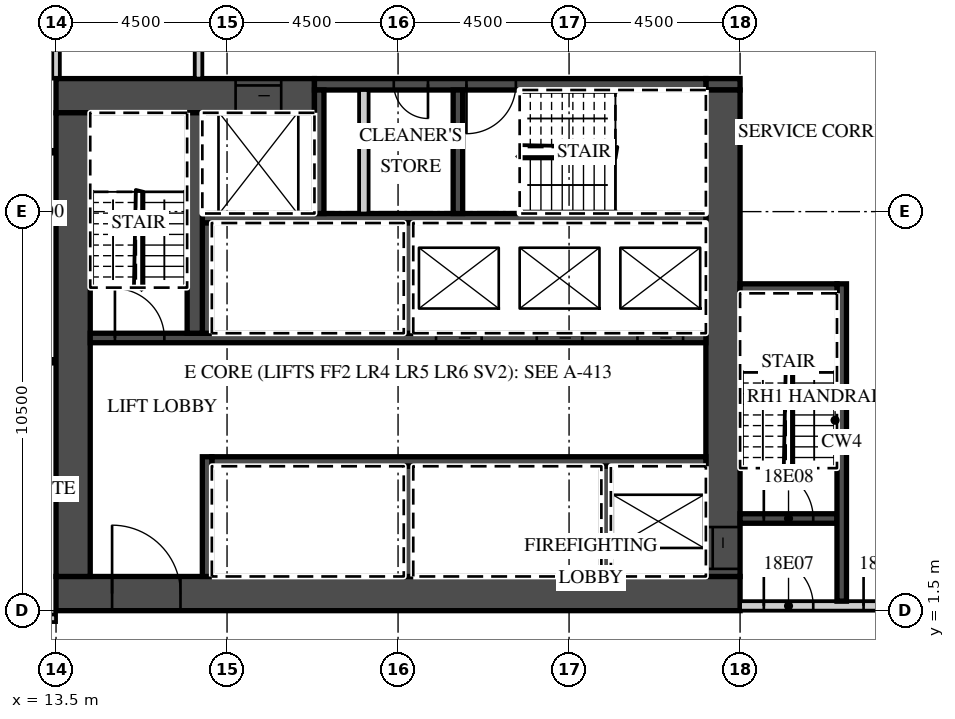
"""IFC4 building model, lengths in metres.
Left out: names, types, materials, properties, quantities, classifications, styles, units other than length and angle.
Written with IfcOpenShell. Run it as: python <this file> out.ifc"""

import sys

from ifc_helpers import new_model, si_unit, direction, frame, frame_2d, origin, place, context, subcontext, project, spatial, rectangle, extrude, element, fill, save


model = new_model("IFC4")
c1 = context("Model", 3, precision=1e-05, world=origin(), true_north=direction((0.0, 1.0)))
c2 = subcontext(c1, "Body", "Model", "MODEL_VIEW")
j1 = project(units=[si_unit("LENGTHUNIT", "METRE"), si_unit("PLANEANGLEUNIT", "RADIAN")], contexts=[c1])
p1 = place(None, origin())
s1 = spatial("IfcSite", under=j1, at=p1, CompositionType="ELEMENT")
p2 = place(p1, origin())
s2 = spatial("IfcBuilding", under=s1, at=p2, CompositionType="ELEMENT")
p3 = place(p2, frame((0.0, 0.0, 89.7)))
s3 = spatial("IfcBuildingStorey", under=s2, at=p3, CompositionType="ELEMENT", Elevation=89.7)
p4 = place(p3, frame((13.5, 15.5, 0.0), z_axis=(0.0, 0.0, 1.0), x_axis=(0.0, 1.0, 0.0)))
e1 = element("IfcWall", 1, at=p4, inside=s3, PredefinedType="PARTITIONING", context=c2, shape_type="SweptSolid", body=[
    extrude(rectangle(XDim=6.05, YDim=0.2, at=frame_2d((3.025, 0.0))), origin(), (0.0, 0.0, 1.0), 3.02),
])
p5 = place(p3, frame((-44.55, 1.3, 0.0), z_axis=(0.0, 0.0, 1.0), x_axis=(1.0, 0.0, 0.0)))
e2 = element("IfcWall", 2, at=p5, inside=s3, PredefinedType="PARTITIONING", context=c2, shape_type="SweptSolid", body=[
    extrude(rectangle(XDim=58.05, YDim=0.2, at=frame_2d((29.025, 0.0))), origin(), (0.0, 0.0, 1.0), 3.02),
])
p6 = place(p5, frame((0.525, 0.0, 0.0)))
e3 = element("IfcOpeningElement", 3, at=p6, cuts=e2, PredefinedType="OPENING", context=c2, shape_type="SweptSolid", body=[
    extrude(rectangle(XDim=1.0, YDim=2.1, at=frame_2d((0.5, 1.05))), frame((0.0, 0.11, 0.0), z_axis=(0.0, -1.0, 0.0), x_axis=(1.0, 0.0, 0.0)), (0.0, 0.0, 1.0), 0.22),
])
p7 = place(p5, frame((6.975, 0.0, 0.0)))
e4 = element("IfcOpeningElement", 4, at=p7, cuts=e2, PredefinedType="OPENING", context=c2, shape_type="SweptSolid", body=[
    extrude(rectangle(XDim=1.0, YDim=2.1, at=frame_2d((0.5, 1.05))), frame((0.0, 0.11, 0.0), z_axis=(0.0, -1.0, 0.0), x_axis=(1.0, 0.0, 0.0)), (0.0, 0.0, 1.0), 0.22),
])
p8 = place(p5, frame((11.5, 0.0, 0.0)))
e5 = element("IfcOpeningElement", 5, at=p8, cuts=e2, PredefinedType="OPENING", context=c2, shape_type="SweptSolid", body=[
    extrude(rectangle(XDim=1.0, YDim=2.1, at=frame_2d((0.5, 1.05))), frame((0.0, 0.11, 0.0), z_axis=(0.0, -1.0, 0.0), x_axis=(1.0, 0.0, 0.0)), (0.0, 0.0, 1.0), 0.22),
])
p9 = place(p5, frame((13.6, 0.0, 0.0)))
e6 = element("IfcOpeningElement", 6, at=p9, cuts=e2, PredefinedType="OPENING", context=c2, shape_type="SweptSolid", body=[
    extrude(rectangle(XDim=1.0, YDim=2.1, at=frame_2d((0.5, 1.05))), frame((0.0, 0.11, 0.0), z_axis=(0.0, -1.0, 0.0), x_axis=(1.0, 0.0, 0.0)), (0.0, 0.0, 1.0), 0.22),
])
p10 = place(p5, frame((22.912, 0.0, 0.0)))
e7 = element("IfcOpeningElement", 7, at=p10, cuts=e2, PredefinedType="OPENING", context=c2, shape_type="SweptSolid", body=[
    extrude(rectangle(XDim=1.2, YDim=2.1, at=frame_2d((0.6, 1.05))), frame((0.0, 0.11, 0.0), z_axis=(0.0, -1.0, 0.0), x_axis=(1.0, 0.0, 0.0)), (0.0, 0.0, 1.0), 0.22),
])
p11 = place(p5, frame((31.912, 0.0, 0.0)))
e8 = element("IfcOpeningElement", 8, at=p11, cuts=e2, PredefinedType="OPENING", context=c2, shape_type="SweptSolid", body=[
    extrude(rectangle(XDim=1.2, YDim=2.1, at=frame_2d((0.6, 1.05))), frame((0.0, 0.11, 0.0), z_axis=(0.0, -1.0, 0.0), x_axis=(1.0, 0.0, 0.0)), (0.0, 0.0, 1.0), 0.22),
])
p12 = place(p5, frame((37.987, 0.0, 0.0)))
e9 = element("IfcOpeningElement", 9, at=p12, cuts=e2, PredefinedType="OPENING", context=c2, shape_type="SweptSolid", body=[
    extrude(rectangle(XDim=1.2, YDim=2.1, at=frame_2d((0.6, 1.05))), frame((0.0, 0.11, 0.0), z_axis=(0.0, -1.0, 0.0), x_axis=(1.0, 0.0, 0.0)), (0.0, 0.0, 1.0), 0.22),
])
p13 = place(p5, frame((46.987, 0.0, 0.0)))
e10 = element("IfcOpeningElement", 10, at=p13, cuts=e2, PredefinedType="OPENING", context=c2, shape_type="SweptSolid", body=[
    extrude(rectangle(XDim=1.2, YDim=2.1, at=frame_2d((0.6, 1.05))), frame((0.0, 0.11, 0.0), z_axis=(0.0, -1.0, 0.0), x_axis=(1.0, 0.0, 0.0)), (0.0, 0.0, 1.0), 0.22),
])
p14 = place(p5, frame((54.125, 0.0, 0.0)))
e11 = element("IfcOpeningElement", 11, at=p14, cuts=e2, PredefinedType="OPENING", context=c2, shape_type="SweptSolid", body=[
    extrude(rectangle(XDim=1.0, YDim=2.1, at=frame_2d((0.5, 1.05))), frame((0.0, 0.11, 0.0), z_axis=(0.0, -1.0, 0.0), x_axis=(1.0, 0.0, 0.0)), (0.0, 0.0, 1.0), 0.22),
])
p15 = place(p3, frame((13.5, 1.95, 0.0), z_axis=(0.0, 0.0, 1.0), x_axis=(1.0, 0.0, 0.0)))
e12 = element("IfcWall", 12, at=p15, inside=s3, PredefinedType="SHEAR", context=c2, shape_type="SweptSolid", body=[
    extrude(rectangle(XDim=18.0, YDim=0.9, at=frame_2d((9.0, 0.0))), origin(), (0.0, 0.0, 1.0), 3.02),
])
p16 = place(p15, frame((1.475, 0.0, 0.0)))
e13 = element("IfcOpeningElement", 13, at=p16, cuts=e12, PredefinedType="OPENING", context=c2, shape_type="SweptSolid", body=[
    extrude(rectangle(XDim=1.8, YDim=2.1, at=frame_2d((0.9, 1.05))), frame((0.0, 0.46, 0.0), z_axis=(0.0, -1.0, 0.0), x_axis=(1.0, 0.0, 0.0)), (0.0, 0.0, 1.0), 0.92),
])
p17 = place(p3, frame((13.5, 15.05, 0.0), z_axis=(0.0, 0.0, 1.0), x_axis=(1.0, 0.0, 0.0)))
e14 = element("IfcWall", 14, at=p17, inside=s3, PredefinedType="SHEAR", context=c2, shape_type="SweptSolid", body=[
    extrude(rectangle(XDim=6.8, YDim=0.9, at=frame_2d((3.4, 0.0))), origin(), (0.0, 0.0, 1.0), 3.02),
])
p18 = place(p17, frame((4.725, 0.0, 0.0)))
e15 = element("IfcOpeningElement", 15, at=p18, cuts=e14, PredefinedType="OPENING", context=c2, shape_type="SweptSolid", body=[
    extrude(rectangle(XDim=1.2, YDim=2.1, at=frame_2d((0.6, 1.05))), frame((0.0, 0.46, 0.0), z_axis=(0.0, -1.0, 0.0), x_axis=(1.0, 0.0, 0.0)), (0.0, 0.0, 1.0), 0.92),
])
p19 = place(p3, frame((30.6, 15.35, 0.0), z_axis=(0.0, 0.0, 1.0), x_axis=(1.0, 0.0, 0.0)))
e16 = element("IfcWall", 16, at=p19, inside=s3, PredefinedType="SHEAR", context=c2, shape_type="SweptSolid", body=[
    extrude(rectangle(XDim=0.9, YDim=0.3, at=frame_2d((0.45, 0.0))), origin(), (0.0, 0.0, 1.0), 3.02),
])
p20 = place(p3, frame((20.3, 15.35, 0.0), z_axis=(0.0, 0.0, 1.0), x_axis=(1.0, 0.0, 0.0)))
e17 = element("IfcWall", 17, at=p20, inside=s3, PredefinedType="SHEAR", context=c2, shape_type="SweptSolid", body=[
    extrude(rectangle(XDim=10.3, YDim=0.3, at=frame_2d((5.15, 0.0))), origin(), (0.0, 0.0, 1.0), 3.02),
])
p21 = place(p20, frame((4.0, 0.0, 0.0)))
e18 = element("IfcOpeningElement", 18, at=p21, cuts=e17, PredefinedType="OPENING", context=c2, shape_type="SweptSolid", body=[
    extrude(rectangle(XDim=1.3, YDim=2.1, at=frame_2d((0.65, 1.05))), frame((0.0, 0.16, 0.0), z_axis=(0.0, -1.0, 0.0), x_axis=(1.0, 0.0, 0.0)), (0.0, 0.0, 1.0), 0.32),
])
p22 = place(p20, frame((2.087, 0.0, 0.0)))
e19 = element("IfcOpeningElement", 19, at=p22, cuts=e17, PredefinedType="OPENING", context=c2, shape_type="SweptSolid", body=[
    extrude(rectangle(XDim=0.9, YDim=2.1, at=frame_2d((0.45, 1.05))), frame((0.0, 0.16, 0.0), z_axis=(0.0, -1.0, 0.0), x_axis=(1.0, 0.0, 0.0)), (0.0, 0.0, 1.0), 0.32),
])
p23 = place(p3, frame((31.05, 2.4, 0.0), z_axis=(0.0, 0.0, 1.0), x_axis=(0.0, 1.0, 0.0)))
e20 = element("IfcWall", 20, at=p23, inside=s3, PredefinedType="SHEAR", context=c2, shape_type="SweptSolid", body=[
    extrude(rectangle(XDim=12.8, YDim=0.9, at=frame_2d((6.4, 0.0))), origin(), (0.0, 0.0, 1.0), 3.02),
])
p24 = place(p23, frame((0.2, 0.0, 0.0)))
e21 = element("IfcOpeningElement", 21, at=p24, cuts=e20, PredefinedType="OPENING", context=c2, shape_type="SweptSolid", body=[
    extrude(rectangle(XDim=1.1, YDim=2.1, at=frame_2d((0.55, 1.05))), frame((0.0, 0.46, 0.0), z_axis=(0.0, -1.0, 0.0), x_axis=(1.0, 0.0, 0.0)), (0.0, 0.0, 1.0), 0.92),
])
p25 = place(p3, frame((13.95, 2.4, 0.0), z_axis=(0.0, 0.0, 1.0), x_axis=(0.0, 1.0, 0.0)))
e22 = element("IfcWall", 22, at=p25, inside=s3, PredefinedType="SHEAR", context=c2, shape_type="SweptSolid", body=[
    extrude(rectangle(XDim=12.2, YDim=0.9, at=frame_2d((6.1, 0.0))), origin(), (0.0, 0.0, 1.0), 3.02),
])
p26 = place(p3, frame((17.6, 5.425, 0.0), z_axis=(0.0, 0.0, 1.0), x_axis=(1.0, 0.0, 0.0)))
e23 = element("IfcWall", 23, at=p26, inside=s3, PredefinedType="SHEAR", context=c2, shape_type="SweptSolid", body=[
    extrude(rectangle(XDim=13.0, YDim=0.25, at=frame_2d((6.5, 0.0))), origin(), (0.0, 0.0, 1.0), 3.02),
])
p27 = place(p3, frame((17.475, 2.4, 0.0), z_axis=(0.0, 0.0, 1.0), x_axis=(0.0, 1.0, 0.0)))
e24 = element("IfcWall", 24, at=p27, inside=s3, PredefinedType="SHEAR", context=c2, shape_type="SweptSolid", body=[
    extrude(rectangle(XDim=3.15, YDim=0.25, at=frame_2d((1.575, 0.0))), origin(), (0.0, 0.0, 1.0), 3.02),
])
for number, where, z_axis, x_axis in (
    (25, (27.975, 2.4, 0.0), (0.0, 0.0, 1.0), (0.0, 1.0, 0.0)),
    (26, (22.775, 2.4, 0.0), (0.0, 0.0, 1.0), (0.0, 1.0, 0.0)),
):
    element("IfcWall", number, at=place(p3, frame(where, z_axis=z_axis, x_axis=x_axis)), inside=s3, PredefinedType="SHEAR", context=c2, shape_type="SweptSolid", body=[
        extrude(rectangle(XDim=2.9, YDim=0.25, at=frame_2d((1.45, 0.0))), origin(), (0.0, 0.0, 1.0), 3.02),
    ])
p28 = place(p3, frame((14.4, 8.675, 0.0), z_axis=(0.0, 0.0, 1.0), x_axis=(1.0, 0.0, 0.0)))
e27 = element("IfcWall", 27, at=p28, inside=s3, PredefinedType="SHEAR", context=c2, shape_type="SweptSolid", body=[
    extrude(rectangle(XDim=16.2, YDim=0.25, at=frame_2d((8.1, 0.0))), origin(), (0.0, 0.0, 1.0), 3.02),
])
p29 = place(p28, frame((14.4, 0.0, 0.0)))
e28 = element("IfcOpeningElement", 28, at=p29, cuts=e27, PredefinedType="OPENING", context=c2, shape_type="SweptSolid", body=[
    extrude(rectangle(XDim=1.2, YDim=2.1, at=frame_2d((0.6, 1.05))), frame((0.0, 0.135, 0.0), z_axis=(0.0, -1.0, 0.0), x_axis=(1.0, 0.0, 0.0)), (0.0, 0.0, 1.0), 0.27),
])
p30 = place(p28, frame((11.75, 0.0, 0.0)))
e29 = element("IfcOpeningElement", 29, at=p30, cuts=e27, PredefinedType="OPENING", context=c2, shape_type="SweptSolid", body=[
    extrude(rectangle(XDim=1.2, YDim=2.1, at=frame_2d((0.6, 1.05))), frame((0.0, 0.135, 0.0), z_axis=(0.0, -1.0, 0.0), x_axis=(1.0, 0.0, 0.0)), (0.0, 0.0, 1.0), 0.27),
])
p31 = place(p28, frame((9.1, 0.0, 0.0)))
e30 = element("IfcOpeningElement", 30, at=p31, cuts=e27, PredefinedType="OPENING", context=c2, shape_type="SweptSolid", body=[
    extrude(rectangle(XDim=1.2, YDim=2.1, at=frame_2d((0.6, 1.05))), frame((0.0, 0.135, 0.0), z_axis=(0.0, -1.0, 0.0), x_axis=(1.0, 0.0, 0.0)), (0.0, 0.0, 1.0), 0.27),
])
p32 = place(p28, frame((0.65, 0.0, 0.0)))
e31 = element("IfcOpeningElement", 31, at=p32, cuts=e27, PredefinedType="OPENING", context=c2, shape_type="SweptSolid", body=[
    extrude(rectangle(XDim=1.3, YDim=2.1, at=frame_2d((0.65, 1.05))), frame((0.0, 0.135, 0.0), z_axis=(0.0, -1.0, 0.0), x_axis=(1.0, 0.0, 0.0)), (0.0, 0.0, 1.0), 0.27),
])
p33 = place(p3, frame((17.35, 11.825, 0.0), z_axis=(0.0, 0.0, 1.0), x_axis=(1.0, 0.0, 0.0)))
e32 = element("IfcWall", 32, at=p33, inside=s3, PredefinedType="SHEAR", context=c2, shape_type="SweptSolid", body=[
    extrude(rectangle(XDim=13.25, YDim=0.25, at=frame_2d((6.625, 0.0))), origin(), (0.0, 0.0, 1.0), 3.02),
])
for number, where, z_axis, x_axis in (
    (33, (17.475, 8.8, 0.0), (0.0, 0.0, 1.0), (0.0, 1.0, 0.0)),
    (34, (22.775, 8.8, 0.0), (0.0, 0.0, 1.0), (0.0, 1.0, 0.0)),
):
    element("IfcWall", number, at=place(p3, frame(where, z_axis=z_axis, x_axis=x_axis)), inside=s3, PredefinedType="SHEAR", context=c2, shape_type="SweptSolid", body=[
        extrude(rectangle(XDim=2.9, YDim=0.25, at=frame_2d((1.45, 0.0))), origin(), (0.0, 0.0, 1.0), 3.02),
    ])
p34 = place(p3, frame((17.15, 8.8, 0.0), z_axis=(0.0, 0.0, 1.0), x_axis=(0.0, 1.0, 0.0)))
e35 = element("IfcWall", 35, at=p34, inside=s3, PredefinedType="SHEAR", context=c2, shape_type="SweptSolid", body=[
    extrude(rectangle(XDim=5.8, YDim=0.4, at=frame_2d((2.9, 0.0))), origin(), (0.0, 0.0, 1.0), 3.02),
])
for number, where, z_axis, x_axis in (
    (36, (20.425, 11.95, 0.0), (0.0, 0.0, 1.0), (0.0, 1.0, 0.0)),
    (37, (24.075, 11.95, 0.0), (0.0, 0.0, 1.0), (0.0, 1.0, 0.0)),
):
    element("IfcWall", number, at=place(p3, frame(where, z_axis=z_axis, x_axis=x_axis)), inside=s3, PredefinedType="SHEAR", context=c2, shape_type="SweptSolid", body=[
        extrude(rectangle(XDim=3.25, YDim=0.25, at=frame_2d((1.625, 0.0))), origin(), (0.0, 0.0, 1.0), 3.02),
    ])
p35 = place(p3, frame((21.6, 11.95, 0.0), z_axis=(0.0, 0.0, 1.0), x_axis=(0.0, 1.0, 0.0)))
e38 = element("IfcWall", 38, at=p35, inside=s3, PredefinedType="PARTITIONING", context=c2, shape_type="SweptSolid", body=[
    extrude(rectangle(XDim=3.25, YDim=0.25, at=frame_2d((1.625, 0.0))), origin(), (0.0, 0.0, 1.0), 3.02),
])
p36 = place(p3, frame((31.5, 1.625, 0.0), z_axis=(0.0, 0.0, 1.0), x_axis=(1.0, 0.0, 0.0)))
e39 = element("IfcWall", 39, at=p36, inside=s3, PredefinedType="PARTITIONING", context=c2, shape_type="SweptSolid", body=[
    extrude(rectangle(XDim=13.05, YDim=0.25, at=frame_2d((6.525, 0.0))), origin(), (0.0, 0.0, 1.0), 3.02),
])
p37 = place(p36, frame((0.625, 0.0, 0.0)))
e40 = element("IfcOpeningElement", 40, at=p37, cuts=e39, PredefinedType="OPENING", context=c2, shape_type="SweptSolid", body=[
    extrude(rectangle(XDim=1.3, YDim=2.1, at=frame_2d((0.65, 1.05))), frame((0.0, 0.135, 0.0), z_axis=(0.0, -1.0, 0.0), x_axis=(1.0, 0.0, 0.0)), (0.0, 0.0, 1.0), 0.27),
])
p38 = place(p36, frame((3.25, 0.0, 0.0)))
e41 = element("IfcOpeningElement", 41, at=p38, cuts=e39, PredefinedType="OPENING", context=c2, shape_type="SweptSolid", body=[
    extrude(rectangle(XDim=1.1, YDim=2.1, at=frame_2d((0.55, 1.05))), frame((0.0, 0.135, 0.0), z_axis=(0.0, -1.0, 0.0), x_axis=(1.0, 0.0, 0.0)), (0.0, 0.0, 1.0), 0.27),
])
p39 = place(p3, frame((31.5, 3.925, 0.0), z_axis=(0.0, 0.0, 1.0), x_axis=(1.0, 0.0, 0.0)))
e42 = element("IfcWall", 42, at=p39, inside=s3, PredefinedType="SHEAR", context=c2, shape_type="SweptSolid", body=[
    extrude(rectangle(XDim=2.55, YDim=0.25, at=frame_2d((1.275, 0.0))), origin(), (0.0, 0.0, 1.0), 3.02),
])
p40 = place(p39, frame((0.625, 0.0, 0.0)))
e43 = element("IfcOpeningElement", 43, at=p40, cuts=e42, PredefinedType="OPENING", context=c2, shape_type="SweptSolid", body=[
    extrude(rectangle(XDim=1.3, YDim=2.1, at=frame_2d((0.65, 1.05))), frame((0.0, 0.135, 0.0), z_axis=(0.0, -1.0, 0.0), x_axis=(1.0, 0.0, 0.0)), (0.0, 0.0, 1.0), 0.27),
])
p41 = place(p3, frame((34.175, 1.75, 0.0), z_axis=(0.0, 0.0, 1.0), x_axis=(0.0, 1.0, 0.0)))
e44 = element("IfcWall", 44, at=p41, inside=s3, PredefinedType="SHEAR", context=c2, shape_type="SweptSolid", body=[
    extrude(rectangle(XDim=8.35, YDim=0.25, at=frame_2d((4.175, 0.0))), origin(), (0.0, 0.0, 1.0), 3.02),
])
p42 = place(p3, frame((31.5, 9.975, 0.0), z_axis=(0.0, 0.0, 1.0), x_axis=(1.0, 0.0, 0.0)))
e45 = element("IfcWall", 45, at=p42, inside=s3, PredefinedType="SHEAR", context=c2, shape_type="SweptSolid", body=[
    extrude(rectangle(XDim=2.55, YDim=0.25, at=frame_2d((1.275, 0.0))), origin(), (0.0, 0.0, 1.0), 3.02),
])
p43 = place(p3, frame((17.25, 15.5, 0.0), z_axis=(0.0, 0.0, 1.0), x_axis=(0.0, 1.0, 0.0)))
e46 = element("IfcWall", 46, at=p43, inside=s3, PredefinedType="PARTITIONING", context=c2, shape_type="SweptSolid", body=[
    extrude(rectangle(XDim=2.2, YDim=0.2, at=frame_2d((1.1, 0.0))), origin(), (0.0, 0.0, 1.0), 3.02),
])
p44 = place(p29, origin())
e47 = element("IfcDoor", 47, at=p44, inside=s3, OperationType="SLIDING_TO_LEFT", PredefinedType="DOOR", context=c2, shape_type="SweptSolid", body=[
    extrude(rectangle(XDim=1.2, YDim=2.1, at=frame_2d((0.6, 1.05))), frame((0.0, 0.025, 0.0), z_axis=(0.0, -1.0, 0.0), x_axis=(1.0, 0.0, 0.0)), (0.0, 0.0, 1.0), 0.05),
])
fill(e28, e47)
p45 = place(p30, origin())
e48 = element("IfcDoor", 48, at=p45, inside=s3, OperationType="SLIDING_TO_RIGHT", PredefinedType="DOOR", context=c2, shape_type="SweptSolid", body=[
    extrude(rectangle(XDim=1.2, YDim=2.1, at=frame_2d((0.6, 1.05))), frame((0.0, 0.025, 0.0), z_axis=(0.0, -1.0, 0.0), x_axis=(1.0, 0.0, 0.0)), (0.0, 0.0, 1.0), 0.05),
])
fill(e29, e48)
p46 = place(p31, origin())
e49 = element("IfcDoor", 49, at=p46, inside=s3, OperationType="SLIDING_TO_RIGHT", PredefinedType="DOOR", context=c2, shape_type="SweptSolid", body=[
    extrude(rectangle(XDim=1.2, YDim=2.1, at=frame_2d((0.6, 1.05))), frame((0.0, 0.025, 0.0), z_axis=(0.0, -1.0, 0.0), x_axis=(1.0, 0.0, 0.0)), (0.0, 0.0, 1.0), 0.05),
])
fill(e30, e49)
p47 = place(p18, origin())
e50 = element("IfcDoor", 50, at=p47, inside=s3, OperationType="SLIDING_TO_LEFT", PredefinedType="DOOR", context=c2, shape_type="SweptSolid", body=[
    extrude(rectangle(XDim=1.2, YDim=2.1, at=frame_2d((0.6, 1.05))), frame((0.0, 0.025, 0.0), z_axis=(0.0, -1.0, 0.0), x_axis=(1.0, 0.0, 0.0)), (0.0, 0.0, 1.0), 0.05),
])
fill(e15, e50)
p48 = place(p24, origin())
e51 = element("IfcDoor", 51, at=p48, inside=s3, OperationType="SLIDING_TO_LEFT", PredefinedType="DOOR", context=c2, shape_type="SweptSolid", body=[
    extrude(rectangle(XDim=1.1, YDim=2.1, at=frame_2d((0.55, 1.05))), frame((0.0, 0.025, 0.0), z_axis=(0.0, -1.0, 0.0), x_axis=(1.0, 0.0, 0.0)), (0.0, 0.0, 1.0), 0.05),
])
fill(e21, e51)
p49 = place(p16, origin())
e52 = element("IfcDoor", 52, at=p49, inside=s3, OperationType="DOUBLE_DOOR_DOUBLE_SWING", PredefinedType="DOOR", context=c2, shape_type="SweptSolid", body=[
    extrude(rectangle(XDim=1.8, YDim=2.1, at=frame_2d((0.9, 1.05))), frame((0.0, 0.025, 0.0), z_axis=(0.0, -1.0, 0.0), x_axis=(1.0, 0.0, 0.0)), (0.0, 0.0, 1.0), 0.05),
])
fill(e13, e52)
p50 = place(p37, origin())
e53 = element("IfcDoor", 53, at=p50, inside=s3, OperationType="SINGLE_SWING_LEFT", PredefinedType="DOOR", context=c2, shape_type="SweptSolid", body=[
    extrude(rectangle(XDim=1.3, YDim=2.1, at=frame_2d((0.65, 1.05))), frame((0.0, 0.025, 0.0), z_axis=(0.0, -1.0, 0.0), x_axis=(1.0, 0.0, 0.0)), (0.0, 0.0, 1.0), 0.05),
])
fill(e40, e53)
p51 = place(p40, origin())
e54 = element("IfcDoor", 54, at=p51, inside=s3, OperationType="SINGLE_SWING_LEFT", PredefinedType="DOOR", context=c2, shape_type="SweptSolid", body=[
    extrude(rectangle(XDim=1.3, YDim=2.1, at=frame_2d((0.65, 1.05))), frame((0.0, 0.025, 0.0), z_axis=(0.0, -1.0, 0.0), x_axis=(1.0, 0.0, 0.0)), (0.0, 0.0, 1.0), 0.05),
])
fill(e43, e54)
p52 = place(p38, origin())
e55 = element("IfcDoor", 55, at=p52, inside=s3, OperationType="SINGLE_SWING_LEFT", PredefinedType="DOOR", context=c2, shape_type="SweptSolid", body=[
    extrude(rectangle(XDim=1.1, YDim=2.1, at=frame_2d((0.55, 1.05))), frame((0.0, 0.025, 0.0), z_axis=(0.0, -1.0, 0.0), x_axis=(1.0, 0.0, 0.0)), (0.0, 0.0, 1.0), 0.05),
])
fill(e41, e55)
p53 = place(p32, origin())
e56 = element("IfcDoor", 56, at=p53, inside=s3, OperationType="SINGLE_SWING_LEFT", PredefinedType="DOOR", context=c2, shape_type="SweptSolid", body=[
    extrude(rectangle(XDim=1.3, YDim=2.1, at=frame_2d((0.65, 1.05))), frame((0.0, 0.025, 0.0), z_axis=(0.0, -1.0, 0.0), x_axis=(1.0, 0.0, 0.0)), (0.0, 0.0, 1.0), 0.05),
])
fill(e31, e56)
p54 = place(p21, origin())
e57 = element("IfcDoor", 57, at=p54, inside=s3, OperationType="SINGLE_SWING_LEFT", PredefinedType="DOOR", context=c2, shape_type="SweptSolid", body=[
    extrude(rectangle(XDim=1.3, YDim=2.1, at=frame_2d((0.65, 1.05))), frame((0.0, 0.025, 0.0), z_axis=(0.0, -1.0, 0.0), x_axis=(1.0, 0.0, 0.0)), (0.0, 0.0, 1.0), 0.05),
])
fill(e18, e57)
p55 = place(p22, origin())
e58 = element("IfcDoor", 58, at=p55, inside=s3, OperationType="SINGLE_SWING_RIGHT", PredefinedType="DOOR", context=c2, shape_type="SweptSolid", body=[
    extrude(rectangle(XDim=0.9, YDim=2.1, at=frame_2d((0.45, 1.05))), frame((0.0, 0.025, 0.0), z_axis=(0.0, -1.0, 0.0), x_axis=(1.0, 0.0, 0.0)), (0.0, 0.0, 1.0), 0.05),
])
fill(e19, e58)
save(model, sys.argv[1])
